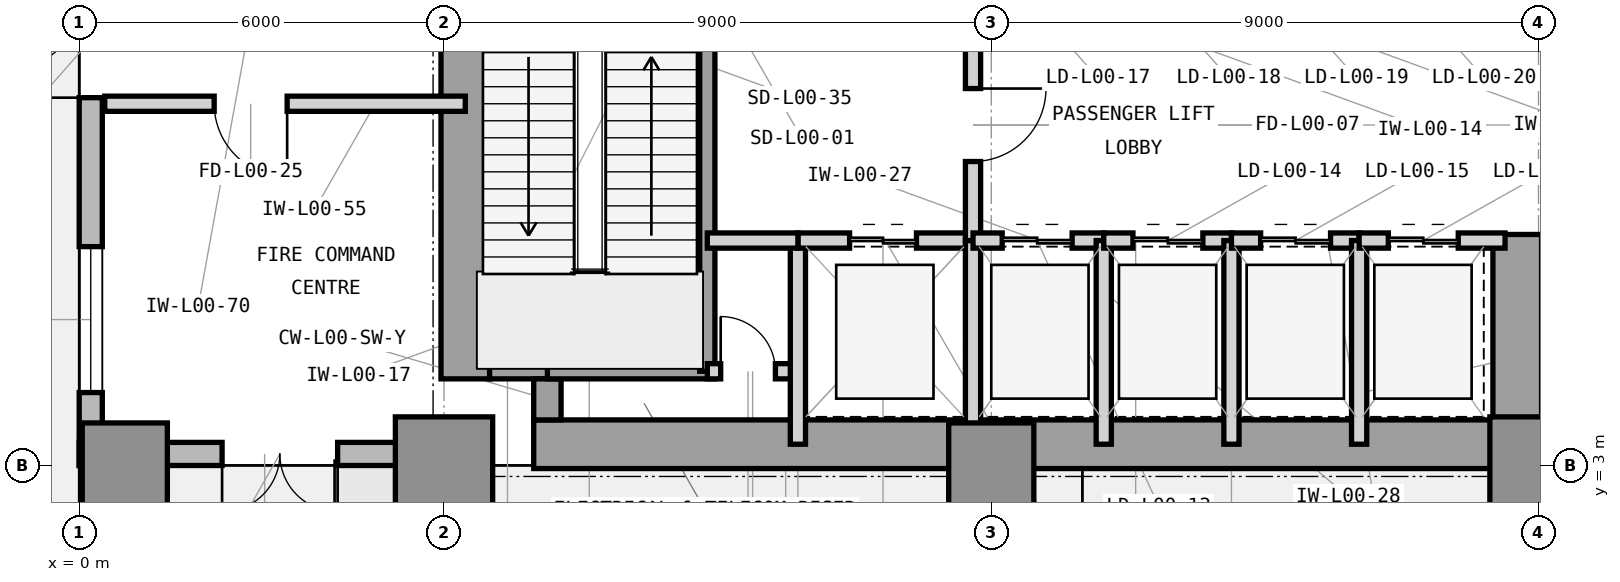
"""IFC4 building model, lengths in metres.
Left out: names, types, materials, properties, quantities, classifications, styles, units other than length and angle.
Written with IfcOpenShell. Run it as: python <this file> out.ifc"""

import sys

from ifc_helpers import new_model, si_unit, direction, frame, frame_2d, origin, origin_2d, place, context, subcontext, project, spatial, rectangle, extrude, element, fill, save


model = new_model("IFC4")
c1 = context("Model", 3, precision=1e-05, world=origin(), true_north=direction((0.0, 1.0)))
c2 = subcontext(c1, "Body", "Model", "MODEL_VIEW")
j1 = project(units=[si_unit("LENGTHUNIT", "METRE"), si_unit("PLANEANGLEUNIT", "RADIAN")], contexts=[c1])
p1 = place(None, origin())
s1 = spatial("IfcSite", under=j1, at=p1, CompositionType="ELEMENT")
p2 = place(p1, origin())
s2 = spatial("IfcBuilding", under=s1, at=p2, CompositionType="ELEMENT")
p3 = place(p2, origin())
s3 = spatial("IfcBuildingStorey", under=s2, at=p3, CompositionType="ELEMENT", Elevation=0.0)
p4 = place(p3, frame((7.475, 3.35, 0.0), z_axis=(0.0, 0.0, 1.0), x_axis=(1.0, 0.0, 0.0)))
e1 = element("IfcWall", 1, at=p4, inside=s3, PredefinedType="SHEAR", context=c2, shape_type="SweptSolid", body=[
    extrude(rectangle(XDim=16.575, YDim=0.8, at=frame_2d((8.288, 0.0))), origin(), (0.0, 0.0, 1.0), 5.4),
])
p5 = place(p3, frame((6.35, 4.425, 0.0), z_axis=(0.0, 0.0, 1.0), x_axis=(0.0, 1.0, 0.0)))
e2 = element("IfcWall", 2, at=p5, inside=s3, PredefinedType="SHEAR", context=c2, shape_type="SweptSolid", body=[
    extrude(rectangle(XDim=15.15, YDim=0.8, at=frame_2d((7.575, 0.0))), origin(), (0.0, 0.0, 1.0), 5.4),
])
p6 = place(p5, frame((5.975, 0.0, 0.0)))
e3 = element("IfcOpeningElement", 3, at=p6, cuts=e2, PredefinedType="OPENING", context=c2, shape_type="SweptSolid", body=[
    extrude(rectangle(XDim=1.25, YDim=2.2, at=frame_2d((0.625, 1.1))), frame((0.0, 0.41, 0.0), z_axis=(0.0, -1.0, 0.0), x_axis=(1.0, 0.0, 0.0)), (0.0, 0.0, 1.0), 0.82),
])
p7 = place(p5, frame((13.375, 0.0, 0.0)))
e4 = element("IfcOpeningElement", 4, at=p7, cuts=e2, PredefinedType="OPENING", context=c2, shape_type="SweptSolid", body=[
    extrude(rectangle(XDim=1.25, YDim=2.2, at=frame_2d((0.625, 1.1))), frame((0.0, 0.41, 0.0), z_axis=(0.0, -1.0, 0.0), x_axis=(1.0, 0.0, 0.0)), (0.0, 0.0, 1.0), 0.82),
])
p8 = place(p3, frame((23.65, 3.75, 0.0), z_axis=(0.0, 0.0, 1.0), x_axis=(0.0, 1.0, 0.0)))
e5 = element("IfcWall", 5, at=p8, inside=s3, PredefinedType="SHEAR", context=c2, shape_type="SweptSolid", body=[
    extrude(rectangle(XDim=3.05, YDim=0.8, at=frame_2d((1.525, 0.0))), origin(), (0.0, 0.0, 1.0), 5.4),
])
p9 = place(p3, frame((6.75, 4.65, 0.0), z_axis=(0.0, 0.0, 1.0), x_axis=(1.0, 0.0, 0.0)))
e6 = element("IfcWall", 6, at=p9, inside=s3, PredefinedType="SHEAR", context=c2, shape_type="SweptSolid", body=[
    extrude(rectangle(XDim=1.175, YDim=0.45, at=frame_2d((0.587, 0.0))), origin(), (0.0, 0.0, 1.0), 5.4),
])
p10 = place(p3, frame((7.7, 3.75, 0.0), z_axis=(0.0, 0.0, 1.0), x_axis=(0.0, 1.0, 0.0)))
e7 = element("IfcWall", 7, at=p10, inside=s3, PredefinedType="SHEAR", context=c2, shape_type="SweptSolid", body=[
    extrude(rectangle(XDim=0.675, YDim=0.45, at=frame_2d((0.337, 0.0))), origin(), (0.0, 0.0, 1.0), 5.4),
])
p11 = place(p3, frame((0.75, 3.0, 0.0), z_axis=(0.0, 0.0, 1.0), x_axis=(1.0, 0.0, 0.0)))
e8 = element("IfcColumn", 8, at=p11, inside=s3, PredefinedType="COLUMN", context=c2, shape_type="SweptSolid", body=[
    extrude(rectangle(XDim=1.4, YDim=1.4, at=origin_2d()), origin(), (0.0, 0.0, 1.0), 5.4),
])
p12 = place(p3, frame((6.0, 3.0, 0.0), z_axis=(0.0, 0.0, 1.0), x_axis=(1.0, 0.0, 0.0)))
e9 = element("IfcColumn", 9, at=p12, inside=s3, PredefinedType="COLUMN", context=c2, shape_type="SweptSolid", body=[
    extrude(rectangle(XDim=1.6, YDim=1.6, at=origin_2d()), origin(), (0.0, 0.0, 1.0), 5.4),
])
p13 = place(p3, frame((15.0, 3.0, 0.0), z_axis=(0.0, 0.0, 1.0), x_axis=(1.0, 0.0, 0.0)))
e10 = element("IfcColumn", 10, at=p13, inside=s3, PredefinedType="COLUMN", context=c2, shape_type="SweptSolid", body=[
    extrude(rectangle(XDim=1.4, YDim=1.4, at=origin_2d()), origin(), (0.0, 0.0, 1.0), 5.4),
])
p14 = place(p3, frame((24.0, 3.0, 0.0), z_axis=(0.0, 0.0, 1.0), x_axis=(1.0, 0.0, 0.0)))
e11 = element("IfcColumn", 11, at=p14, inside=s3, PredefinedType="COLUMN", context=c2, shape_type="SweptSolid", body=[
    extrude(rectangle(XDim=1.6, YDim=1.6, at=origin_2d()), origin(), (0.0, 0.0, 1.0), 5.4),
])
p15 = place(p3, frame((0.0, 3.19, 0.0), z_axis=(0.0, 0.0, 1.0), x_axis=(1.0, 0.0, 0.0)))
e12 = element("IfcWall", 12, at=p15, inside=s3, PredefinedType="STANDARD", context=c2, shape_type="SweptSolid", body=[
    extrude(rectangle(XDim=6.1, YDim=0.38, at=frame_2d((3.05, 0.0))), origin(), (0.0, 0.0, 1.0), 4.234),
])
p16 = place(p15, frame((2.35, 0.0, 0.0)))
e13 = element("IfcOpeningElement", 13, at=p16, cuts=e12, PredefinedType="OPENING", context=c2, shape_type="SweptSolid", body=[
    extrude(rectangle(XDim=1.9, YDim=2.4, at=frame_2d((0.95, 1.2))), frame((0.0, 0.2, 0.0), z_axis=(0.0, -1.0, 0.0), x_axis=(1.0, 0.0, 0.0)), (0.0, 0.0, 1.0), 0.4),
])
p17 = place(p3, frame((24.0, 3.19, 0.0), z_axis=(0.0, 0.0, 1.0), x_axis=(1.0, 0.0, 0.0)))
e14 = element("IfcWall", 14, at=p17, inside=s3, PredefinedType="STANDARD", context=c2, shape_type="SweptSolid", body=[
    extrude(rectangle(XDim=9.0, YDim=0.38, at=frame_2d((4.5, 0.0))), origin(), (0.0, 0.0, 1.0), 4.234),
])
p18 = place(p17, frame((3.2, 0.0, 0.0)))
e15 = element("IfcOpeningElement", 15, at=p18, cuts=e14, PredefinedType="OPENING", context=c2, shape_type="SweptSolid", body=[
    extrude(rectangle(XDim=2.4, YDim=2.8, at=frame_2d((1.2, 1.4))), frame((0.0, 0.2, 0.0), z_axis=(0.0, -1.0, 0.0), x_axis=(1.0, 0.0, 0.0)), (0.0, 0.0, 1.0), 0.4),
])
p19 = place(p3, frame((0.19, 51.0, 0.0), z_axis=(0.0, 0.0, 1.0), x_axis=(0.0, -1.0, 0.0)))
e16 = element("IfcWall", 16, at=p19, inside=s3, PredefinedType="STANDARD", context=c2, shape_type="SweptSolid", body=[
    extrude(rectangle(XDim=48.0, YDim=0.38, at=frame_2d((24.0, 0.0))), origin(), (0.0, 0.0, 1.0), 5.1),
])
p20 = place(p19, frame((33.6, 0.0, 0.0)))
e17 = element("IfcOpeningElement", 17, at=p20, cuts=e16, PredefinedType="OPENING", context=c2, shape_type="SweptSolid", body=[
    extrude(rectangle(XDim=2.4, YDim=2.8, at=frame_2d((1.2, 1.4))), frame((0.0, 0.2, 0.0), z_axis=(0.0, -1.0, 0.0), x_axis=(1.0, 0.0, 0.0)), (0.0, 0.0, 1.0), 0.4),
])
p21 = place(p19, frame((40.05, 0.0, 0.0)))
e18 = element("IfcOpeningElement", 18, at=p21, cuts=e16, PredefinedType="OPENING", context=c2, shape_type="SweptSolid", body=[
    extrude(rectangle(XDim=1.9, YDim=2.4, at=frame_2d((0.95, 1.2))), frame((0.0, 0.2, 0.0), z_axis=(0.0, -1.0, 0.0), x_axis=(1.0, 0.0, 0.0)), (0.0, 0.0, 1.0), 0.4),
])
p22 = place(p19, frame((44.4, 0.0, 1.0)))
e19 = element("IfcOpeningElement", 19, at=p22, cuts=e16, PredefinedType="OPENING", context=c2, shape_type="SweptSolid", body=[
    extrude(rectangle(XDim=2.4, YDim=2.9, at=frame_2d((1.2, 1.45))), frame((0.0, 0.2, 0.0), z_axis=(0.0, -1.0, 0.0), x_axis=(1.0, 0.0, 0.0)), (0.0, 0.0, 1.0), 0.4),
])
p23 = place(p3, frame((7.7, 4.55, 0.0), z_axis=(0.0, 0.0, 1.0), x_axis=(1.0, 0.0, 0.0)))
e20 = element("IfcWall", 20, at=p23, inside=s3, PredefinedType="SHEAR", context=c2, shape_type="SweptSolid", body=[
    extrude(rectangle(XDim=2.755, YDim=0.25, at=frame_2d((1.377, 0.0))), origin(), (0.0, 0.0, 1.0), 5.4),
])
p24 = place(p3, frame((10.33, 4.55, 0.0), z_axis=(0.0, 0.0, 1.0), x_axis=(0.0, 1.0, 0.0)))
e21 = element("IfcWall", 21, at=p24, inside=s3, PredefinedType="SHEAR", context=c2, shape_type="SweptSolid", body=[
    extrude(rectangle(XDim=7.45, YDim=0.25, at=frame_2d((3.725, 0.0))), origin(), (0.0, 0.0, 1.0), 5.4),
])
p25 = place(p24, frame((5.9, 0.0, 0.0)))
e22 = element("IfcOpeningElement", 22, at=p25, cuts=e21, PredefinedType="OPENING", context=c2, shape_type="SweptSolid", body=[
    extrude(rectangle(XDim=1.25, YDim=2.2, at=frame_2d((0.625, 1.1))), frame((0.0, 0.135, 0.0), z_axis=(0.0, -1.0, 0.0), x_axis=(1.0, 0.0, 0.0)), (0.0, 0.0, 1.0), 0.27),
])
p26 = place(p3, frame((10.33, 4.55, 0.0), z_axis=(0.0, 0.0, 1.0), x_axis=(1.0, 0.0, 0.0)))
e23 = element("IfcWall", 23, at=p26, inside=s3, PredefinedType="PARTITIONING", context=c2, shape_type="SweptSolid", body=[
    extrude(rectangle(XDim=1.49, YDim=0.25, at=frame_2d((0.745, 0.0))), origin(), (0.0, 0.0, 1.0), 5.09),
])
p27 = place(p26, frame((0.22, 0.0, 0.0)))
e24 = element("IfcOpeningElement", 24, at=p27, cuts=e23, PredefinedType="OPENING", context=c2, shape_type="SweptSolid", body=[
    extrude(rectangle(XDim=0.9, YDim=2.1, at=frame_2d((0.45, 1.05))), frame((0.0, 0.135, 0.0), z_axis=(0.0, -1.0, 0.0), x_axis=(1.0, 0.0, 0.0)), (0.0, 0.0, 1.0), 0.27),
])
p28 = place(p3, frame((11.82, 3.35, 0.0), z_axis=(0.0, 0.0, 1.0), x_axis=(0.0, 1.0, 0.0)))
e25 = element("IfcWall", 25, at=p28, inside=s3, PredefinedType="PARTITIONING", context=c2, shape_type="SweptSolid", body=[
    extrude(rectangle(XDim=3.35, YDim=0.25, at=frame_2d((1.675, 0.0))), origin(), (0.0, 0.0, 1.0), 5.09),
])
p29 = place(p3, frame((11.82, 6.7, 0.0), z_axis=(0.0, 0.0, 1.0), x_axis=(1.0, 0.0, 0.0)))
e26 = element("IfcWall", 26, at=p29, inside=s3, PredefinedType="PARTITIONING", context=c2, shape_type="SweptSolid", body=[
    extrude(rectangle(XDim=2.88, YDim=0.25, at=frame_2d((1.44, 0.0))), origin(), (0.0, 0.0, 1.0), 4.473),
])
p30 = place(p29, frame((0.85, 0.0, 0.0)))
e27 = element("IfcOpeningElement", 27, at=p30, cuts=e26, PredefinedType="OPENING", context=c2, shape_type="SweptSolid", body=[
    extrude(rectangle(XDim=1.1, YDim=2.25, at=frame_2d((0.55, 1.125))), frame((0.0, 0.135, 0.0), z_axis=(0.0, -1.0, 0.0), x_axis=(1.0, 0.0, 0.0)), (0.0, 0.0, 1.0), 0.27),
])
p31 = place(p3, frame((14.7, 3.35, 0.0), z_axis=(0.0, 0.0, 1.0), x_axis=(0.0, 1.0, 0.0)))
e28 = element("IfcWall", 28, at=p31, inside=s3, PredefinedType="PARTITIONING", context=c2, shape_type="SweptSolid", body=[
    extrude(rectangle(XDim=3.35, YDim=0.25, at=frame_2d((1.675, 0.0))), origin(), (0.0, 0.0, 1.0), 5.09),
])
p32 = place(p3, frame((14.7, 6.7, 0.0), z_axis=(0.0, 0.0, 1.0), x_axis=(0.0, 1.0, 0.0)))
e29 = element("IfcWall", 29, at=p32, inside=s3, PredefinedType="PARTITIONING", context=c2, shape_type="SweptSolid", body=[
    extrude(rectangle(XDim=3.8, YDim=0.25, at=frame_2d((1.9, 0.0))), origin(), (0.0, 0.0, 1.0), 5.09),
])
p33 = place(p32, frame((1.3, 0.0, 0.0)))
e30 = element("IfcOpeningElement", 30, at=p33, cuts=e29, PredefinedType="OPENING", context=c2, shape_type="SweptSolid", body=[
    extrude(rectangle(XDim=1.2, YDim=2.2, at=frame_2d((0.6, 1.1))), frame((0.0, 0.135, 0.0), z_axis=(0.0, -1.0, 0.0), x_axis=(1.0, 0.0, 0.0)), (0.0, 0.0, 1.0), 0.27),
])
p34 = place(p3, frame((10.33, 6.7, 0.0), z_axis=(0.0, 0.0, 1.0), x_axis=(1.0, 0.0, 0.0)))
e31 = element("IfcWall", 31, at=p34, inside=s3, PredefinedType="PARTITIONING", context=c2, shape_type="SweptSolid", body=[
    extrude(rectangle(XDim=1.49, YDim=0.25, at=frame_2d((0.745, 0.0))), origin(), (0.0, 0.0, 1.0), 4.473),
])
p35 = place(p3, frame((14.7, 6.7, 0.0), z_axis=(0.0, 0.0, 1.0), x_axis=(1.0, 0.0, 0.0)))
e32 = element("IfcWall", 32, at=p35, inside=s3, PredefinedType="PARTITIONING", context=c2, shape_type="SweptSolid", body=[
    extrude(rectangle(XDim=2.15, YDim=0.25, at=frame_2d((1.075, 0.0))), origin(), (0.0, 0.0, 1.0), 4.473),
])
p36 = place(p35, frame((0.48, 0.0, 0.0)))
e33 = element("IfcOpeningElement", 33, at=p36, cuts=e32, PredefinedType="OPENING", context=c2, shape_type="SweptSolid", body=[
    extrude(rectangle(XDim=1.15, YDim=2.25, at=frame_2d((0.575, 1.125))), frame((0.0, 0.135, 0.0), z_axis=(0.0, -1.0, 0.0), x_axis=(1.0, 0.0, 0.0)), (0.0, 0.0, 1.0), 0.27),
])
p37 = place(p3, frame((16.85, 3.35, 0.0), z_axis=(0.0, 0.0, 1.0), x_axis=(0.0, 1.0, 0.0)))
e34 = element("IfcWall", 34, at=p37, inside=s3, PredefinedType="PARTITIONING", context=c2, shape_type="SweptSolid", body=[
    extrude(rectangle(XDim=3.35, YDim=0.25, at=frame_2d((1.675, 0.0))), origin(), (0.0, 0.0, 1.0), 5.09),
])
p38 = place(p3, frame((16.85, 6.7, 0.0), z_axis=(0.0, 0.0, 1.0), x_axis=(1.0, 0.0, 0.0)))
e35 = element("IfcWall", 35, at=p38, inside=s3, PredefinedType="PARTITIONING", context=c2, shape_type="SweptSolid", body=[
    extrude(rectangle(XDim=2.1, YDim=0.25, at=frame_2d((1.05, 0.0))), origin(), (0.0, 0.0, 1.0), 4.473),
])
p39 = place(p38, frame((0.48, 0.0, 0.0)))
e36 = element("IfcOpeningElement", 36, at=p39, cuts=e35, PredefinedType="OPENING", context=c2, shape_type="SweptSolid", body=[
    extrude(rectangle(XDim=1.15, YDim=2.25, at=frame_2d((0.575, 1.125))), frame((0.0, 0.135, 0.0), z_axis=(0.0, -1.0, 0.0), x_axis=(1.0, 0.0, 0.0)), (0.0, 0.0, 1.0), 0.27),
])
p40 = place(p3, frame((18.95, 3.35, 0.0), z_axis=(0.0, 0.0, 1.0), x_axis=(0.0, 1.0, 0.0)))
e37 = element("IfcWall", 37, at=p40, inside=s3, PredefinedType="PARTITIONING", context=c2, shape_type="SweptSolid", body=[
    extrude(rectangle(XDim=3.35, YDim=0.25, at=frame_2d((1.675, 0.0))), origin(), (0.0, 0.0, 1.0), 5.09),
])
p41 = place(p3, frame((18.95, 6.7, 0.0), z_axis=(0.0, 0.0, 1.0), x_axis=(1.0, 0.0, 0.0)))
e38 = element("IfcWall", 38, at=p41, inside=s3, PredefinedType="PARTITIONING", context=c2, shape_type="SweptSolid", body=[
    extrude(rectangle(XDim=2.1, YDim=0.25, at=frame_2d((1.05, 0.0))), origin(), (0.0, 0.0, 1.0), 4.473),
])
p42 = place(p41, frame((0.48, 0.0, 0.0)))
e39 = element("IfcOpeningElement", 39, at=p42, cuts=e38, PredefinedType="OPENING", context=c2, shape_type="SweptSolid", body=[
    extrude(rectangle(XDim=1.15, YDim=2.25, at=frame_2d((0.575, 1.125))), frame((0.0, 0.135, 0.0), z_axis=(0.0, -1.0, 0.0), x_axis=(1.0, 0.0, 0.0)), (0.0, 0.0, 1.0), 0.27),
])
p43 = place(p3, frame((21.05, 3.35, 0.0), z_axis=(0.0, 0.0, 1.0), x_axis=(0.0, 1.0, 0.0)))
e40 = element("IfcWall", 40, at=p43, inside=s3, PredefinedType="PARTITIONING", context=c2, shape_type="SweptSolid", body=[
    extrude(rectangle(XDim=3.35, YDim=0.25, at=frame_2d((1.675, 0.0))), origin(), (0.0, 0.0, 1.0), 5.09),
])
p44 = place(p3, frame((21.05, 6.7, 0.0), z_axis=(0.0, 0.0, 1.0), x_axis=(1.0, 0.0, 0.0)))
e41 = element("IfcWall", 41, at=p44, inside=s3, PredefinedType="PARTITIONING", context=c2, shape_type="SweptSolid", body=[
    extrude(rectangle(XDim=2.4, YDim=0.25, at=frame_2d((1.2, 0.0))), origin(), (0.0, 0.0, 1.0), 4.473),
])
p45 = place(p44, frame((0.48, 0.0, 0.0)))
e42 = element("IfcOpeningElement", 42, at=p45, cuts=e41, PredefinedType="OPENING", context=c2, shape_type="SweptSolid", body=[
    extrude(rectangle(XDim=1.15, YDim=2.25, at=frame_2d((0.575, 1.125))), frame((0.0, 0.135, 0.0), z_axis=(0.0, -1.0, 0.0), x_axis=(1.0, 0.0, 0.0)), (0.0, 0.0, 1.0), 0.27),
])
p46 = place(p3, frame((0.42, 8.95, 0.0), z_axis=(0.0, 0.0, 1.0), x_axis=(1.0, 0.0, 0.0)))
e43 = element("IfcWall", 43, at=p46, inside=s3, PredefinedType="PARTITIONING", context=c2, shape_type="SweptSolid", body=[
    extrude(rectangle(XDim=5.93, YDim=0.25, at=frame_2d((2.965, 0.0))), origin(), (0.0, 0.0, 1.0), 4.473),
])
p47 = place(p46, frame((1.8, 0.0, 0.0)))
e44 = element("IfcOpeningElement", 44, at=p47, cuts=e43, PredefinedType="OPENING", context=c2, shape_type="SweptSolid", body=[
    extrude(rectangle(XDim=1.2, YDim=2.2, at=frame_2d((0.6, 1.1))), frame((0.0, 0.135, 0.0), z_axis=(0.0, -1.0, 0.0), x_axis=(1.0, 0.0, 0.0)), (0.0, 0.0, 1.0), 0.27),
])
p48 = place(p16, frame((1.9, 0.0, 0.0), z_axis=(0.0, 0.0, 1.0), x_axis=(-1.0, 0.0, 0.0)))
e45 = element("IfcDoor", 45, at=p48, inside=s3, OperationType="DOUBLE_DOOR_SINGLE_SWING", PredefinedType="DOOR", context=c2, shape_type="SweptSolid", body=[
    extrude(rectangle(XDim=1.9, YDim=2.4, at=frame_2d((0.95, 1.2))), frame((0.0, 0.025, 0.0), z_axis=(0.0, -1.0, 0.0), x_axis=(1.0, 0.0, 0.0)), (0.0, 0.0, 1.0), 0.05),
])
fill(e13, e45)
p49 = place(p21, frame((1.9, 0.0, 0.0), z_axis=(0.0, 0.0, 1.0), x_axis=(-1.0, 0.0, 0.0)))
e46 = element("IfcDoor", 46, at=p49, inside=s3, OperationType="DOUBLE_DOOR_SINGLE_SWING", PredefinedType="DOOR", context=c2, shape_type="SweptSolid", body=[
    extrude(rectangle(XDim=1.9, YDim=2.4, at=frame_2d((0.95, 1.2))), frame((0.0, 0.025, 0.0), z_axis=(0.0, -1.0, 0.0), x_axis=(1.0, 0.0, 0.0)), (0.0, 0.0, 1.0), 0.05),
])
fill(e18, e46)
p50 = place(p22, origin())
e47 = element("IfcWindow", 47, at=p50, inside=s3, PartitioningType="SINGLE_PANEL", PredefinedType="WINDOW", context=c2, shape_type="SweptSolid", body=[
    extrude(rectangle(XDim=2.4, YDim=2.9, at=frame_2d((1.2, 1.45))), frame((0.0, 0.11, 0.0), z_axis=(0.0, -1.0, 0.0), x_axis=(1.0, 0.0, 0.0)), (0.0, 0.0, 1.0), 0.06),
])
fill(e19, e47)
p51 = place(p27, origin())
e48 = element("IfcDoor", 48, at=p51, inside=s3, OperationType="SINGLE_SWING_LEFT", PredefinedType="TRAPDOOR", context=c2, shape_type="SweptSolid", body=[
    extrude(rectangle(XDim=0.9, YDim=2.1, at=frame_2d((0.45, 1.05))), frame((0.0, 0.025, 0.0), z_axis=(0.0, -1.0, 0.0), x_axis=(1.0, 0.0, 0.0)), (0.0, 0.0, 1.0), 0.05),
])
fill(e24, e48)
p52 = place(p30, origin())
e49 = element("IfcDoor", 49, at=p52, inside=s3, OperationType="DOUBLE_DOOR_SLIDING", PredefinedType="DOOR", context=c2, shape_type="SweptSolid", body=[
    extrude(rectangle(XDim=1.1, YDim=2.25, at=frame_2d((0.55, 1.125))), frame((0.0, 0.025, 0.0), z_axis=(0.0, -1.0, 0.0), x_axis=(1.0, 0.0, 0.0)), (0.0, 0.0, 1.0), 0.05),
])
fill(e27, e49)
p53 = place(p33, frame((1.2, 0.0, 0.0), z_axis=(0.0, 0.0, 1.0), x_axis=(-1.0, 0.0, 0.0)))
e50 = element("IfcDoor", 50, at=p53, inside=s3, OperationType="SINGLE_SWING_LEFT", PredefinedType="DOOR", context=c2, shape_type="SweptSolid", body=[
    extrude(rectangle(XDim=1.2, YDim=2.2, at=frame_2d((0.6, 1.1))), frame((0.0, 0.025, 0.0), z_axis=(0.0, -1.0, 0.0), x_axis=(1.0, 0.0, 0.0)), (0.0, 0.0, 1.0), 0.05),
])
fill(e30, e50)
p54 = place(p36, origin())
e51 = element("IfcDoor", 51, at=p54, inside=s3, OperationType="DOUBLE_DOOR_SLIDING", PredefinedType="DOOR", context=c2, shape_type="SweptSolid", body=[
    extrude(rectangle(XDim=1.15, YDim=2.25, at=frame_2d((0.575, 1.125))), frame((0.0, 0.025, 0.0), z_axis=(0.0, -1.0, 0.0), x_axis=(1.0, 0.0, 0.0)), (0.0, 0.0, 1.0), 0.05),
])
fill(e33, e51)
p55 = place(p39, origin())
e52 = element("IfcDoor", 52, at=p55, inside=s3, OperationType="DOUBLE_DOOR_SLIDING", PredefinedType="DOOR", context=c2, shape_type="SweptSolid", body=[
    extrude(rectangle(XDim=1.15, YDim=2.25, at=frame_2d((0.575, 1.125))), frame((0.0, 0.025, 0.0), z_axis=(0.0, -1.0, 0.0), x_axis=(1.0, 0.0, 0.0)), (0.0, 0.0, 1.0), 0.05),
])
fill(e36, e52)
p56 = place(p42, origin())
e53 = element("IfcDoor", 53, at=p56, inside=s3, OperationType="DOUBLE_DOOR_SLIDING", PredefinedType="DOOR", context=c2, shape_type="SweptSolid", body=[
    extrude(rectangle(XDim=1.15, YDim=2.25, at=frame_2d((0.575, 1.125))), frame((0.0, 0.025, 0.0), z_axis=(0.0, -1.0, 0.0), x_axis=(1.0, 0.0, 0.0)), (0.0, 0.0, 1.0), 0.05),
])
fill(e39, e53)
p57 = place(p45, origin())
e54 = element("IfcDoor", 54, at=p57, inside=s3, OperationType="DOUBLE_DOOR_SLIDING", PredefinedType="DOOR", context=c2, shape_type="SweptSolid", body=[
    extrude(rectangle(XDim=1.15, YDim=2.25, at=frame_2d((0.575, 1.125))), frame((0.0, 0.025, 0.0), z_axis=(0.0, -1.0, 0.0), x_axis=(1.0, 0.0, 0.0)), (0.0, 0.0, 1.0), 0.05),
])
fill(e42, e54)
p58 = place(p47, frame((1.2, 0.0, 0.0), z_axis=(0.0, 0.0, 1.0), x_axis=(-1.0, 0.0, 0.0)))
e55 = element("IfcDoor", 55, at=p58, inside=s3, OperationType="SINGLE_SWING_LEFT", PredefinedType="DOOR", context=c2, shape_type="SweptSolid", body=[
    extrude(rectangle(XDim=1.2, YDim=2.2, at=frame_2d((0.6, 1.1))), frame((0.0, 0.025, 0.0), z_axis=(0.0, -1.0, 0.0), x_axis=(1.0, 0.0, 0.0)), (0.0, 0.0, 1.0), 0.05),
])
fill(e44, e55)
save(model, sys.argv[1])
